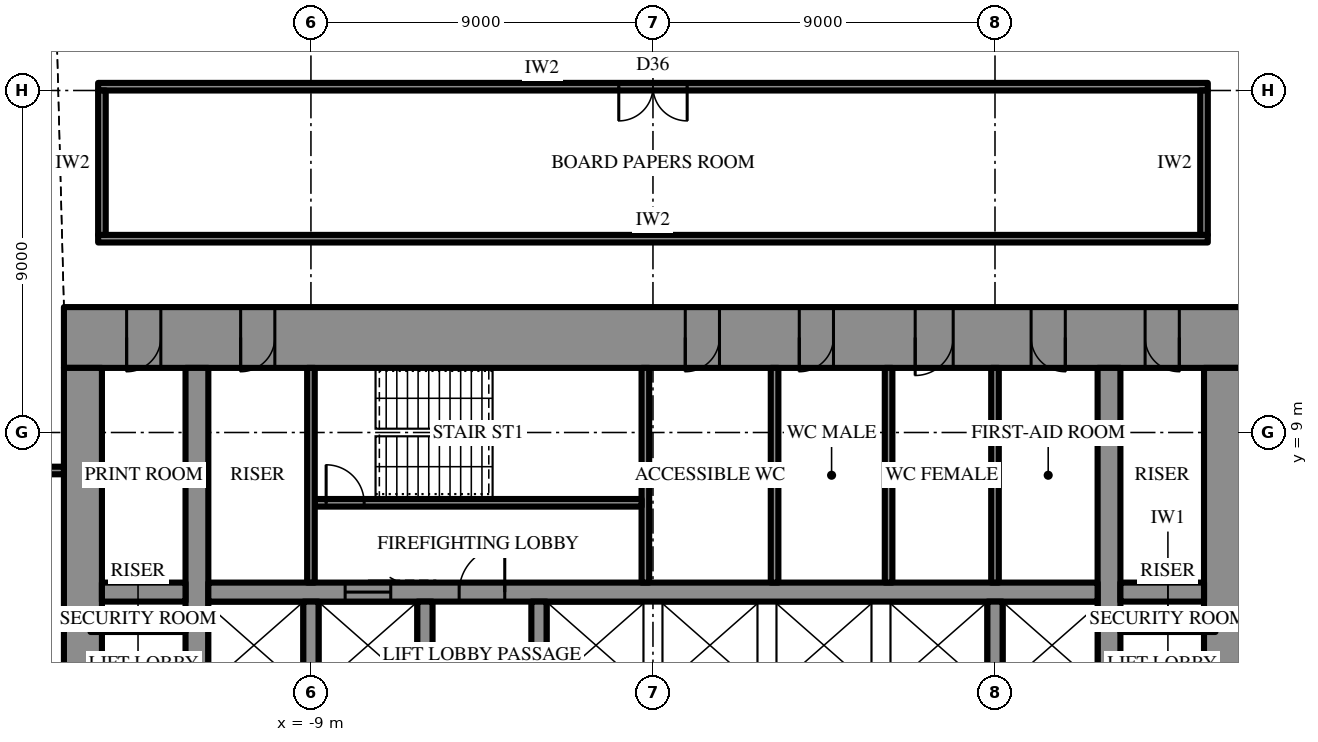
"""IFC4 building model, lengths in metres.
Left out: names, types, materials, properties, quantities, classifications, styles, units other than length and angle.
Written with IfcOpenShell. Run it as: python <this file> out.ifc"""

import sys

from ifc_helpers import new_model, si_unit, direction, frame, frame_2d, origin, place, context, subcontext, project, spatial, rectangle, extrude, element, fill, save


model = new_model("IFC4")
c1 = context("Model", 3, precision=1e-05, world=origin(), true_north=direction((0.0, 1.0)))
c2 = subcontext(c1, "Body", "Model", "MODEL_VIEW")
j1 = project(units=[si_unit("LENGTHUNIT", "METRE"), si_unit("PLANEANGLEUNIT", "RADIAN")], contexts=[c1])
p1 = place(None, origin())
s1 = spatial("IfcSite", under=j1, at=p1, CompositionType="ELEMENT")
p2 = place(p1, origin())
s2 = spatial("IfcBuilding", under=s1, at=p2, CompositionType="ELEMENT")
p3 = place(p2, frame((0.0, 0.0, 253.3)))
s3 = spatial("IfcBuildingStorey", under=s2, at=p3, CompositionType="ELEMENT", Elevation=253.3)
p4 = place(p3, frame((-15.5, 11.5, 0.0), z_axis=(0.0, 0.0, 1.0), x_axis=(1.0, 0.0, 0.0)))
e1 = element("IfcWall", 1, at=p4, inside=s3, PredefinedType="SHEAR", context=c2, shape_type="SweptSolid", body=[
    extrude(rectangle(XDim=31.0, YDim=1.6, at=frame_2d((15.5, 0.0))), origin(), (0.0, 0.0, 1.0), 4.2),
])
p5 = place(p4, frame((16.35, 0.0, 0.0)))
e2 = element("IfcOpeningElement", 2, at=p5, cuts=e1, PredefinedType="OPENING", context=c2, shape_type="SweptSolid", body=[
    extrude(rectangle(XDim=0.9, YDim=2.2, at=frame_2d((0.45, 1.1))), frame((0.0, 0.81, 0.0), z_axis=(0.0, -1.0, 0.0), x_axis=(1.0, 0.0, 0.0)), (0.0, 0.0, 1.0), 1.62),
])
p6 = place(p4, frame((19.35, 0.0, 0.0)))
e3 = element("IfcOpeningElement", 3, at=p6, cuts=e1, PredefinedType="OPENING", context=c2, shape_type="SweptSolid", body=[
    extrude(rectangle(XDim=0.9, YDim=2.2, at=frame_2d((0.45, 1.1))), frame((0.0, 0.81, 0.0), z_axis=(0.0, -1.0, 0.0), x_axis=(1.0, 0.0, 0.0)), (0.0, 0.0, 1.0), 1.62),
])
p7 = place(p4, frame((22.4, 0.0, 0.0)))
e4 = element("IfcOpeningElement", 4, at=p7, cuts=e1, PredefinedType="OPENING", context=c2, shape_type="SweptSolid", body=[
    extrude(rectangle(XDim=1.0, YDim=2.2, at=frame_2d((0.5, 1.1))), frame((0.0, 0.81, 0.0), z_axis=(0.0, -1.0, 0.0), x_axis=(1.0, 0.0, 0.0)), (0.0, 0.0, 1.0), 1.62),
])
p8 = place(p4, frame((1.65, 0.0, 0.0)))
e5 = element("IfcOpeningElement", 5, at=p8, cuts=e1, PredefinedType="OPENING", context=c2, shape_type="SweptSolid", body=[
    extrude(rectangle(XDim=0.9, YDim=2.2, at=frame_2d((0.45, 1.1))), frame((0.0, 0.81, 0.0), z_axis=(0.0, -1.0, 0.0), x_axis=(1.0, 0.0, 0.0)), (0.0, 0.0, 1.0), 1.62),
])
p9 = place(p4, frame((4.65, 0.0, 0.0)))
e6 = element("IfcOpeningElement", 6, at=p9, cuts=e1, PredefinedType="OPENING", context=c2, shape_type="SweptSolid", body=[
    extrude(rectangle(XDim=0.9, YDim=2.2, at=frame_2d((0.45, 1.1))), frame((0.0, 0.81, 0.0), z_axis=(0.0, -1.0, 0.0), x_axis=(1.0, 0.0, 0.0)), (0.0, 0.0, 1.0), 1.62),
])
p10 = place(p4, frame((25.45, 0.0, 0.0)))
e7 = element("IfcOpeningElement", 7, at=p10, cuts=e1, PredefinedType="OPENING", context=c2, shape_type="SweptSolid", body=[
    extrude(rectangle(XDim=0.9, YDim=2.2, at=frame_2d((0.45, 1.1))), frame((0.0, 0.81, 0.0), z_axis=(0.0, -1.0, 0.0), x_axis=(1.0, 0.0, 0.0)), (0.0, 0.0, 1.0), 1.62),
])
p11 = place(p4, frame((28.45, 0.0, 0.0)))
e8 = element("IfcOpeningElement", 8, at=p11, cuts=e1, PredefinedType="OPENING", context=c2, shape_type="SweptSolid", body=[
    extrude(rectangle(XDim=0.9, YDim=2.2, at=frame_2d((0.45, 1.1))), frame((0.0, 0.81, 0.0), z_axis=(0.0, -1.0, 0.0), x_axis=(1.0, 0.0, 0.0)), (0.0, 0.0, 1.0), 1.62),
])
p12 = place(p3, frame((15.0, -10.7, 0.0), z_axis=(0.0, 0.0, 1.0), x_axis=(0.0, 1.0, 0.0)))
e9 = element("IfcWall", 9, at=p12, inside=s3, PredefinedType="SHEAR", context=c2, shape_type="SweptSolid", body=[
    extrude(rectangle(XDim=21.4, YDim=1.0, at=frame_2d((10.7, 0.0))), origin(), (0.0, 0.0, 1.0), 4.2),
])
p13 = place(p12, frame((9.8, 0.0, 0.0)))
e10 = element("IfcOpeningElement", 10, at=p13, cuts=e9, PredefinedType="OPENING", context=c2, shape_type="SweptSolid", body=[
    extrude(rectangle(XDim=1.8, YDim=2.4, at=frame_2d((0.9, 1.2))), frame((0.0, 0.51, 0.0), z_axis=(0.0, -1.0, 0.0), x_axis=(1.0, 0.0, 0.0)), (0.0, 0.0, 1.0), 1.02),
])
p14 = place(p3, frame((-15.0, 10.7, 0.0), z_axis=(0.0, 0.0, 1.0), x_axis=(0.0, -1.0, 0.0)))
e11 = element("IfcWall", 11, at=p14, inside=s3, PredefinedType="SHEAR", context=c2, shape_type="SweptSolid", body=[
    extrude(rectangle(XDim=21.4, YDim=1.0, at=frame_2d((10.7, 0.0))), origin(), (0.0, 0.0, 1.0), 4.2),
])
p15 = place(p14, frame((9.8, 0.0, 0.0)))
e12 = element("IfcOpeningElement", 12, at=p15, cuts=e11, PredefinedType="OPENING", context=c2, shape_type="SweptSolid", body=[
    extrude(rectangle(XDim=1.8, YDim=2.4, at=frame_2d((0.9, 1.2))), frame((0.0, 0.51, 0.0), z_axis=(0.0, -1.0, 0.0), x_axis=(1.0, 0.0, 0.0)), (0.0, 0.0, 1.0), 1.02),
])
p16 = place(p3, frame((12.0, -10.7, 0.0), z_axis=(0.0, 0.0, 1.0), x_axis=(0.0, 1.0, 0.0)))
e13 = element("IfcWall", 13, at=p16, inside=s3, PredefinedType="SHEAR", context=c2, shape_type="SweptSolid", body=[
    extrude(rectangle(XDim=21.4, YDim=0.6, at=frame_2d((10.7, 0.0))), origin(), (0.0, 0.0, 1.0), 4.2),
])
p17 = place(p16, frame((9.8, 0.0, 0.0)))
e14 = element("IfcOpeningElement", 14, at=p17, cuts=e13, PredefinedType="OPENING", context=c2, shape_type="SweptSolid", body=[
    extrude(rectangle(XDim=1.8, YDim=2.4, at=frame_2d((0.9, 1.2))), frame((0.0, 0.31, 0.0), z_axis=(0.0, -1.0, 0.0), x_axis=(1.0, 0.0, 0.0)), (0.0, 0.0, 1.0), 0.62),
])
p18 = place(p3, frame((-12.0, -10.7, 0.0), z_axis=(0.0, 0.0, 1.0), x_axis=(0.0, 1.0, 0.0)))
e15 = element("IfcWall", 15, at=p18, inside=s3, PredefinedType="SHEAR", context=c2, shape_type="SweptSolid", body=[
    extrude(rectangle(XDim=21.4, YDim=0.6, at=frame_2d((10.7, 0.0))), origin(), (0.0, 0.0, 1.0), 4.2),
])
p19 = place(p18, frame((9.8, 0.0, 0.0)))
e16 = element("IfcOpeningElement", 16, at=p19, cuts=e15, PredefinedType="OPENING", context=c2, shape_type="SweptSolid", body=[
    extrude(rectangle(XDim=1.8, YDim=2.4, at=frame_2d((0.9, 1.2))), frame((0.0, 0.31, 0.0), z_axis=(0.0, -1.0, 0.0), x_axis=(1.0, 0.0, 0.0)), (0.0, 0.0, 1.0), 0.62),
])
p20 = place(p3, frame((-14.5, 4.8, 0.0), z_axis=(0.0, 0.0, 1.0), x_axis=(1.0, 0.0, 0.0)))
e17 = element("IfcWall", 17, at=p20, inside=s3, PredefinedType="SHEAR", context=c2, shape_type="SweptSolid", body=[
    extrude(rectangle(XDim=2.2, YDim=0.5, at=frame_2d((1.1, 0.0))), origin(), (0.0, 0.0, 1.0), 4.2),
])
p21 = place(p3, frame((-11.7, 4.8, 0.0), z_axis=(0.0, 0.0, 1.0), x_axis=(1.0, 0.0, 0.0)))
e18 = element("IfcWall", 18, at=p21, inside=s3, PredefinedType="SHEAR", context=c2, shape_type="SweptSolid", body=[
    extrude(rectangle(XDim=23.4, YDim=0.5, at=frame_2d((11.7, 0.0))), origin(), (0.0, 0.0, 1.0), 4.2),
])
p22 = place(p21, frame((6.6, 0.0, 0.0)))
e19 = element("IfcOpeningElement", 19, at=p22, cuts=e18, PredefinedType="OPENING", context=c2, shape_type="SweptSolid", body=[
    extrude(rectangle(XDim=1.2, YDim=2.2, at=frame_2d((0.6, 1.1))), frame((0.0, 0.26, 0.0), z_axis=(0.0, -1.0, 0.0), x_axis=(1.0, 0.0, 0.0)), (0.0, 0.0, 1.0), 0.52),
])
p23 = place(p21, frame((3.6, 0.0, 0.0)))
e20 = element("IfcOpeningElement", 20, at=p23, cuts=e18, PredefinedType="OPENING", context=c2, shape_type="SweptSolid", body=[
    extrude(rectangle(XDim=1.2, YDim=2.2, at=frame_2d((0.6, 1.1))), frame((0.0, 0.26, 0.0), z_axis=(0.0, -1.0, 0.0), x_axis=(1.0, 0.0, 0.0)), (0.0, 0.0, 1.0), 0.52),
])
p24 = place(p3, frame((12.3, 4.8, 0.0), z_axis=(0.0, 0.0, 1.0), x_axis=(1.0, 0.0, 0.0)))
e21 = element("IfcWall", 21, at=p24, inside=s3, PredefinedType="SHEAR", context=c2, shape_type="SweptSolid", body=[
    extrude(rectangle(XDim=2.2, YDim=0.5, at=frame_2d((1.1, 0.0))), origin(), (0.0, 0.0, 1.0), 4.2),
])
for number, where, z_axis, x_axis in (
    (22, (-9.0, 2.25, 0.0), (0.0, 0.0, 1.0), (0.0, 1.0, 0.0)),
    (23, (-6.0, 2.25, 0.0), (0.0, 0.0, 1.0), (0.0, 1.0, 0.0)),
    (24, (-3.0, 2.25, 0.0), (0.0, 0.0, 1.0), (0.0, 1.0, 0.0)),
    (25, (9.0, 2.25, 0.0), (0.0, 0.0, 1.0), (0.0, 1.0, 0.0)),
):
    element("IfcWall", number, at=place(p3, frame(where, z_axis=z_axis, x_axis=x_axis)), inside=s3, PredefinedType="SHEAR", context=c2, shape_type="SweptSolid", body=[
        extrude(rectangle(XDim=2.3, YDim=0.4, at=frame_2d((1.15, 0.0))), origin(), (0.0, 0.0, 1.0), 4.2),
    ])
p25 = place(p3, frame((-0.2, 5.05, 0.0), z_axis=(0.0, 0.0, 1.0), x_axis=(0.0, 1.0, 0.0)))
e26 = element("IfcWall", 26, at=p25, inside=s3, PredefinedType="SHEAR", context=c2, shape_type="SweptSolid", body=[
    extrude(rectangle(XDim=5.65, YDim=0.2, at=frame_2d((2.825, 0.0))), origin(), (0.0, 0.0, 1.0), 4.2),
])
p26 = place(p3, frame((-8.9, 7.15, 0.0), z_axis=(0.0, 0.0, 1.0), x_axis=(1.0, 0.0, 0.0)))
e27 = element("IfcWall", 27, at=p26, inside=s3, PredefinedType="SHEAR", context=c2, shape_type="SweptSolid", body=[
    extrude(rectangle(XDim=8.6, YDim=0.2, at=frame_2d((4.3, 0.0))), origin(), (0.0, 0.0, 1.0), 4.2),
])
p27 = place(p26, frame((0.3, 0.0, 0.0)))
e28 = element("IfcOpeningElement", 28, at=p27, cuts=e27, PredefinedType="OPENING", context=c2, shape_type="SweptSolid", body=[
    extrude(rectangle(XDim=1.0, YDim=2.2, at=frame_2d((0.5, 1.1))), frame((0.0, 0.11, 0.0), z_axis=(0.0, -1.0, 0.0), x_axis=(1.0, 0.0, 0.0)), (0.0, 0.0, 1.0), 0.22),
])
for number, where, z_axis, x_axis in (
    (29, (-9.0, 5.05, 0.0), (0.0, 0.0, 1.0), (0.0, 1.0, 0.0)),
    (30, (9.0, 5.05, 0.0), (0.0, 0.0, 1.0), (0.0, 1.0, 0.0)),
    (31, (3.2, 5.05, 0.0), (0.0, 0.0, 1.0), (0.0, 1.0, 0.0)),
    (32, (6.2, 5.05, 0.0), (0.0, 0.0, 1.0), (0.0, 1.0, 0.0)),
):
    element("IfcWall", number, at=place(p3, frame(where, z_axis=z_axis, x_axis=x_axis)), inside=s3, PredefinedType="PARTITIONING", context=c2, shape_type="SweptSolid", body=[
        extrude(rectangle(XDim=5.65, YDim=0.2, at=frame_2d((2.825, 0.0))), origin(), (0.0, 0.0, 1.0), 4.0),
    ])
for number, where, z_axis, x_axis in (
    (33, (-14.8, 3.85, 0.0), (0.0, 0.0, 1.0), (1.0, 0.0, 0.0)),
    (34, (12.3, 3.85, 0.0), (0.0, 0.0, 1.0), (1.0, 0.0, 0.0)),
):
    element("IfcWall", number, at=place(p3, frame(where, z_axis=z_axis, x_axis=x_axis)), inside=s3, PredefinedType="PARTITIONING", context=c2, shape_type="SweptSolid", body=[
        extrude(rectangle(XDim=2.5, YDim=0.2, at=frame_2d((1.25, 0.0))), origin(), (0.0, 0.0, 1.0), 4.0),
    ])
p28 = place(p3, frame((-14.6, 14.1, 0.0), z_axis=(0.0, 0.0, 1.0), x_axis=(1.0, 0.0, 0.0)))
e35 = element("IfcWall", 35, at=p28, inside=s3, PredefinedType="PARTITIONING", context=c2, shape_type="SweptSolid", body=[
    extrude(rectangle(XDim=29.2, YDim=0.2, at=frame_2d((14.6, 0.0))), origin(), (0.0, 0.0, 1.0), 4.0),
])
p29 = place(p3, frame((-14.6, 18.1, 0.0), z_axis=(0.0, 0.0, 1.0), x_axis=(1.0, 0.0, 0.0)))
e36 = element("IfcWall", 36, at=p29, inside=s3, PredefinedType="PARTITIONING", context=c2, shape_type="SweptSolid", body=[
    extrude(rectangle(XDim=29.2, YDim=0.2, at=frame_2d((14.6, 0.0))), origin(), (0.0, 0.0, 1.0), 4.0),
])
p30 = place(p29, frame((13.7, 0.0, 0.0)))
e37 = element("IfcOpeningElement", 37, at=p30, cuts=e36, PredefinedType="OPENING", context=c2, shape_type="SweptSolid", body=[
    extrude(rectangle(XDim=1.8, YDim=2.4, at=frame_2d((0.9, 1.2))), frame((0.0, 0.11, 0.0), z_axis=(0.0, -1.0, 0.0), x_axis=(1.0, 0.0, 0.0)), (0.0, 0.0, 1.0), 0.22),
])
for number, where, z_axis, x_axis in (
    (38, (-14.5, 14.2, 0.0), (0.0, 0.0, 1.0), (0.0, 1.0, 0.0)),
    (39, (14.5, 14.2, 0.0), (0.0, 0.0, 1.0), (0.0, 1.0, 0.0)),
):
    element("IfcWall", number, at=place(p3, frame(where, z_axis=z_axis, x_axis=x_axis)), inside=s3, PredefinedType="PARTITIONING", context=c2, shape_type="SweptSolid", body=[
        extrude(rectangle(XDim=3.8, YDim=0.2, at=frame_2d((1.9, 0.0))), origin(), (0.0, 0.0, 1.0), 4.0),
    ])
p31 = place(p3, frame((-15.5, 8.0, 0.0), z_axis=(0.0, 0.0, 1.0), x_axis=(-1.0, 0.0, 0.0)))
e40 = element("IfcWall", 40, at=p31, inside=s3, PredefinedType="PARTITIONING", context=c2, shape_type="SweptSolid", body=[
    extrude(rectangle(XDim=13.113, YDim=0.2, at=frame_2d((6.557, 0.0))), origin(), (0.0, 0.0, 1.0), 4.0),
])
p32 = place(p31, frame((0.811, 0.0, 0.0)))
e41 = element("IfcOpeningElement", 41, at=p32, cuts=e40, PredefinedType="OPENING", context=c2, shape_type="SweptSolid", body=[
    extrude(rectangle(XDim=1.0, YDim=2.2, at=frame_2d((0.5, 1.1))), frame((0.0, 0.11, 0.0), z_axis=(0.0, -1.0, 0.0), x_axis=(1.0, 0.0, 0.0)), (0.0, 0.0, 1.0), 0.22),
])
p33 = place(p22, origin())
e42 = element("IfcDoor", 42, at=p33, inside=s3, OperationType="SINGLE_SWING_LEFT", PredefinedType="DOOR", context=c2, shape_type="SweptSolid", body=[
    extrude(rectangle(XDim=1.2, YDim=2.2, at=frame_2d((0.6, 1.1))), frame((0.0, 0.025, 0.0), z_axis=(0.0, -1.0, 0.0), x_axis=(1.0, 0.0, 0.0)), (0.0, 0.0, 1.0), 0.05),
])
fill(e19, e42)
p34 = place(p27, origin())
e43 = element("IfcDoor", 43, at=p34, inside=s3, OperationType="SINGLE_SWING_RIGHT", PredefinedType="DOOR", context=c2, shape_type="SweptSolid", body=[
    extrude(rectangle(XDim=1.0, YDim=2.2, at=frame_2d((0.5, 1.1))), frame((0.0, 0.025, 0.0), z_axis=(0.0, -1.0, 0.0), x_axis=(1.0, 0.0, 0.0)), (0.0, 0.0, 1.0), 0.05),
])
fill(e28, e43)
p35 = place(p5, frame((0.9, 0.0, 0.0), z_axis=(0.0, 0.0, 1.0), x_axis=(-1.0, 0.0, 0.0)))
e44 = element("IfcDoor", 44, at=p35, inside=s3, OperationType="SINGLE_SWING_LEFT", PredefinedType="DOOR", context=c2, shape_type="SweptSolid", body=[
    extrude(rectangle(XDim=0.9, YDim=2.2, at=frame_2d((0.45, 1.1))), frame((0.0, 0.025, 0.0), z_axis=(0.0, -1.0, 0.0), x_axis=(1.0, 0.0, 0.0)), (0.0, 0.0, 1.0), 0.05),
])
fill(e2, e44)
p36 = place(p6, frame((0.9, 0.0, 0.0), z_axis=(0.0, 0.0, 1.0), x_axis=(-1.0, 0.0, 0.0)))
e45 = element("IfcDoor", 45, at=p36, inside=s3, OperationType="SINGLE_SWING_LEFT", PredefinedType="DOOR", context=c2, shape_type="SweptSolid", body=[
    extrude(rectangle(XDim=0.9, YDim=2.2, at=frame_2d((0.45, 1.1))), frame((0.0, 0.025, 0.0), z_axis=(0.0, -1.0, 0.0), x_axis=(1.0, 0.0, 0.0)), (0.0, 0.0, 1.0), 0.05),
])
fill(e3, e45)
p37 = place(p7, frame((1.0, 0.0, 0.0), z_axis=(0.0, 0.0, 1.0), x_axis=(-1.0, 0.0, 0.0)))
e46 = element("IfcDoor", 46, at=p37, inside=s3, OperationType="SINGLE_SWING_LEFT", PredefinedType="DOOR", context=c2, shape_type="SweptSolid", body=[
    extrude(rectangle(XDim=1.0, YDim=2.2, at=frame_2d((0.5, 1.1))), frame((0.0, 0.025, 0.0), z_axis=(0.0, -1.0, 0.0), x_axis=(1.0, 0.0, 0.0)), (0.0, 0.0, 1.0), 0.05),
])
fill(e4, e46)
p38 = place(p8, frame((0.9, 0.0, 0.0), z_axis=(0.0, 0.0, 1.0), x_axis=(-1.0, 0.0, 0.0)))
e47 = element("IfcDoor", 47, at=p38, inside=s3, OperationType="SINGLE_SWING_LEFT", PredefinedType="DOOR", context=c2, shape_type="SweptSolid", body=[
    extrude(rectangle(XDim=0.9, YDim=2.2, at=frame_2d((0.45, 1.1))), frame((0.0, 0.025, 0.0), z_axis=(0.0, -1.0, 0.0), x_axis=(1.0, 0.0, 0.0)), (0.0, 0.0, 1.0), 0.05),
])
fill(e5, e47)
p39 = place(p9, frame((0.9, 0.0, 0.0), z_axis=(0.0, 0.0, 1.0), x_axis=(-1.0, 0.0, 0.0)))
e48 = element("IfcDoor", 48, at=p39, inside=s3, OperationType="SINGLE_SWING_LEFT", PredefinedType="DOOR", context=c2, shape_type="SweptSolid", body=[
    extrude(rectangle(XDim=0.9, YDim=2.2, at=frame_2d((0.45, 1.1))), frame((0.0, 0.025, 0.0), z_axis=(0.0, -1.0, 0.0), x_axis=(1.0, 0.0, 0.0)), (0.0, 0.0, 1.0), 0.05),
])
fill(e6, e48)
p40 = place(p10, frame((0.9, 0.0, 0.0), z_axis=(0.0, 0.0, 1.0), x_axis=(-1.0, 0.0, 0.0)))
e49 = element("IfcDoor", 49, at=p40, inside=s3, OperationType="SINGLE_SWING_RIGHT", PredefinedType="DOOR", context=c2, shape_type="SweptSolid", body=[
    extrude(rectangle(XDim=0.9, YDim=2.2, at=frame_2d((0.45, 1.1))), frame((0.0, 0.025, 0.0), z_axis=(0.0, -1.0, 0.0), x_axis=(1.0, 0.0, 0.0)), (0.0, 0.0, 1.0), 0.05),
])
fill(e7, e49)
p41 = place(p11, frame((0.9, 0.0, 0.0), z_axis=(0.0, 0.0, 1.0), x_axis=(-1.0, 0.0, 0.0)))
e50 = element("IfcDoor", 50, at=p41, inside=s3, OperationType="SINGLE_SWING_RIGHT", PredefinedType="DOOR", context=c2, shape_type="SweptSolid", body=[
    extrude(rectangle(XDim=0.9, YDim=2.2, at=frame_2d((0.45, 1.1))), frame((0.0, 0.025, 0.0), z_axis=(0.0, -1.0, 0.0), x_axis=(1.0, 0.0, 0.0)), (0.0, 0.0, 1.0), 0.05),
])
fill(e8, e50)
p42 = place(p23, origin())
e51 = element("IfcDoor", 51, at=p42, inside=s3, OperationType="SLIDING_TO_LEFT", PredefinedType="DOOR", context=c2, shape_type="SweptSolid", body=[
    extrude(rectangle(XDim=1.2, YDim=2.2, at=frame_2d((0.6, 1.1))), frame((0.0, 0.025, 0.0), z_axis=(0.0, -1.0, 0.0), x_axis=(1.0, 0.0, 0.0)), (0.0, 0.0, 1.0), 0.05),
])
fill(e20, e51)
p43 = place(p30, frame((1.8, 0.0, 0.0), z_axis=(0.0, 0.0, 1.0), x_axis=(-1.0, 0.0, 0.0)))
e52 = element("IfcDoor", 52, at=p43, inside=s3, OperationType="DOUBLE_DOOR_SINGLE_SWING", PredefinedType="DOOR", context=c2, shape_type="SweptSolid", body=[
    extrude(rectangle(XDim=1.8, YDim=2.4, at=frame_2d((0.9, 1.2))), frame((0.0, 0.025, 0.0), z_axis=(0.0, -1.0, 0.0), x_axis=(1.0, 0.0, 0.0)), (0.0, 0.0, 1.0), 0.05),
])
fill(e37, e52)
save(model, sys.argv[1])
